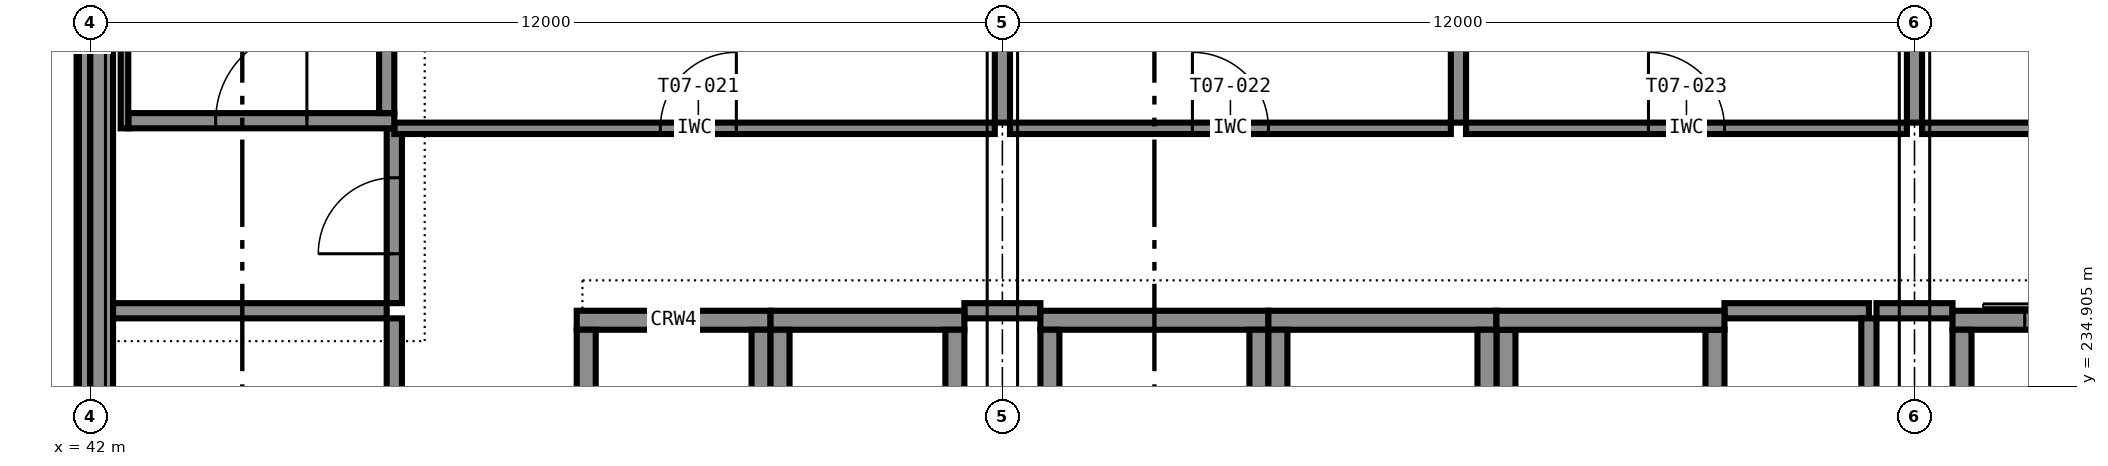
"""IFC4 building model, lengths in metres.
Left out: names, types, materials, properties, quantities, classifications, styles, units other than length and angle.
Written with IfcOpenShell. Run it as: python <this file> out.ifc"""

import sys

from ifc_helpers import new_model, si_unit, direction, frame, frame_2d, origin, place, context, subcontext, project, spatial, rectangle, extrude, element, fill, save


model = new_model("IFC4")
c1 = context("Model", 3, precision=1e-05, world=origin(), true_north=direction((0.0, 1.0)))
c2 = subcontext(c1, "Body", "Model", "MODEL_VIEW")
j1 = project(units=[si_unit("LENGTHUNIT", "METRE"), si_unit("PLANEANGLEUNIT", "RADIAN")], contexts=[c1])
p1 = place(None, origin())
s1 = spatial("IfcSite", under=j1, at=p1, CompositionType="ELEMENT")
p2 = place(p1, origin())
s2 = spatial("IfcBuilding", under=s1, at=p2, CompositionType="ELEMENT")
p3 = place(p2, frame((0.0, 0.0, 31.8)))
s3 = spatial("IfcBuildingStorey", under=s2, at=p3, CompositionType="ELEMENT", Elevation=31.8)
p4 = place(p3, frame((54.5, 235.775, 0.0), z_axis=(0.0, 0.0, 1.0), x_axis=(1.0, 0.0, 0.0)))
e1 = element("IfcWall", 1, at=p4, inside=s3, PredefinedType="SHEAR", context=c2, shape_type="SweptSolid", body=[
    extrude(rectangle(XDim=3.0, YDim=0.25, at=frame_2d((1.5, 0.0))), origin(), (0.0, 0.0, 1.0), 3.6),
])
for number, where, z_axis, x_axis in (
    (2, (54.625, 232.35, 0.0), (0.0, 0.0, 1.0), (0.0, 1.0, 0.0)),
    (3, (57.375, 232.35, 0.0), (0.0, 0.0, 1.0), (0.0, 1.0, 0.0)),
):
    element("IfcWall", number, at=place(p3, frame(where, z_axis=z_axis, x_axis=x_axis)), inside=s3, PredefinedType="SHEAR", context=c2, shape_type="SweptSolid", body=[
        extrude(rectangle(XDim=3.3, YDim=0.25, at=frame_2d((1.65, 0.0))), origin(), (0.0, 0.0, 1.0), 3.6),
    ])
p5 = place(p3, frame((57.5, 235.775, 0.0), z_axis=(0.0, 0.0, 1.0), x_axis=(1.0, 0.0, 0.0)))
e4 = element("IfcWall", 4, at=p5, inside=s3, PredefinedType="SHEAR", context=c2, shape_type="SweptSolid", body=[
    extrude(rectangle(XDim=3.0, YDim=0.25, at=frame_2d((1.5, 0.0))), origin(), (0.0, 0.0, 1.0), 3.6),
])
for number, where, z_axis, x_axis in (
    (5, (57.625, 232.35, 0.0), (0.0, 0.0, 1.0), (0.0, 1.0, 0.0)),
    (6, (60.375, 232.35, 0.0), (0.0, 0.0, 1.0), (0.0, 1.0, 0.0)),
):
    element("IfcWall", number, at=place(p3, frame(where, z_axis=z_axis, x_axis=x_axis)), inside=s3, PredefinedType="SHEAR", context=c2, shape_type="SweptSolid", body=[
        extrude(rectangle(XDim=3.3, YDim=0.25, at=frame_2d((1.65, 0.0))), origin(), (0.0, 0.0, 1.0), 3.6),
    ])
p6 = place(p3, frame((60.5, 235.775, 0.0), z_axis=(0.0, 0.0, 1.0), x_axis=(1.0, 0.0, 0.0)))
e7 = element("IfcWall", 7, at=p6, inside=s3, PredefinedType="SHEAR", context=c2, shape_type="SweptSolid", body=[
    extrude(rectangle(XDim=3.0, YDim=0.25, at=frame_2d((1.5, 0.0))), origin(), (0.0, 0.0, 1.0), 3.6),
])
for number, where, z_axis, x_axis in (
    (8, (60.625, 232.35, 0.0), (0.0, 0.0, 1.0), (0.0, 1.0, 0.0)),
    (9, (63.375, 232.35, 0.0), (0.0, 0.0, 1.0), (0.0, 1.0, 0.0)),
):
    element("IfcWall", number, at=place(p3, frame(where, z_axis=z_axis, x_axis=x_axis)), inside=s3, PredefinedType="SHEAR", context=c2, shape_type="SweptSolid", body=[
        extrude(rectangle(XDim=3.3, YDim=0.25, at=frame_2d((1.65, 0.0))), origin(), (0.0, 0.0, 1.0), 3.6),
    ])
p7 = place(p3, frame((66.5, 235.775, 0.0), z_axis=(0.0, 0.0, 1.0), x_axis=(1.0, 0.0, 0.0)))
e10 = element("IfcWall", 10, at=p7, inside=s3, PredefinedType="SHEAR", context=c2, shape_type="SweptSolid", body=[
    extrude(rectangle(XDim=3.0, YDim=0.25, at=frame_2d((1.5, 0.0))), origin(), (0.0, 0.0, 1.0), 3.6),
])
p8 = place(p7, frame((0.95, 0.0, 0.0)))
e11 = element("IfcOpeningElement", 11, at=p8, cuts=e10, PredefinedType="OPENING", context=c2, shape_type="SweptSolid", body=[
    extrude(rectangle(XDim=1.1, YDim=2.1, at=frame_2d((0.55, 1.05))), frame((0.0, 0.135, 0.0), z_axis=(0.0, -1.0, 0.0), x_axis=(1.0, 0.0, 0.0)), (0.0, 0.0, 1.0), 0.27),
])
p9 = place(p3, frame((66.625, 232.35, 0.0), z_axis=(0.0, 0.0, 1.0), x_axis=(0.0, 1.0, 0.0)))
e12 = element("IfcWall", 12, at=p9, inside=s3, PredefinedType="SHEAR", context=c2, shape_type="SweptSolid", body=[
    extrude(rectangle(XDim=3.3, YDim=0.25, at=frame_2d((1.65, 0.0))), origin(), (0.0, 0.0, 1.0), 3.6),
])
p10 = place(p3, frame((48.4, 235.775, 0.0), z_axis=(0.0, 0.0, 1.0), x_axis=(1.0, 0.0, 0.0)))
e13 = element("IfcWall", 13, at=p10, inside=s3, PredefinedType="SHEAR", context=c2, shape_type="SweptSolid", body=[
    extrude(rectangle(XDim=2.55, YDim=0.25, at=frame_2d((1.275, 0.0))), origin(), (0.0, 0.0, 1.0), 3.6),
])
for number, where, z_axis, x_axis in (
    (14, (48.525, 232.35, 0.0), (0.0, 0.0, 1.0), (0.0, 1.0, 0.0)),
    (15, (50.825, 232.35, 0.0), (0.0, 0.0, 1.0), (0.0, 1.0, 0.0)),
):
    element("IfcWall", number, at=place(p3, frame(where, z_axis=z_axis, x_axis=x_axis)), inside=s3, PredefinedType="SHEAR", context=c2, shape_type="SweptSolid", body=[
        extrude(rectangle(XDim=3.3, YDim=0.25, at=frame_2d((1.65, 0.0))), origin(), (0.0, 0.0, 1.0), 3.6),
    ])
p11 = place(p3, frame((50.95, 235.775, 0.0), z_axis=(0.0, 0.0, 1.0), x_axis=(1.0, 0.0, 0.0)))
e16 = element("IfcWall", 16, at=p11, inside=s3, PredefinedType="SHEAR", context=c2, shape_type="SweptSolid", body=[
    extrude(rectangle(XDim=2.55, YDim=0.25, at=frame_2d((1.275, 0.0))), origin(), (0.0, 0.0, 1.0), 3.6),
])
for number, where, z_axis, x_axis in (
    (17, (51.075, 232.35, 0.0), (0.0, 0.0, 1.0), (0.0, 1.0, 0.0)),
    (18, (53.375, 232.35, 0.0), (0.0, 0.0, 1.0), (0.0, 1.0, 0.0)),
):
    element("IfcWall", number, at=place(p3, frame(where, z_axis=z_axis, x_axis=x_axis)), inside=s3, PredefinedType="SHEAR", context=c2, shape_type="SweptSolid", body=[
        extrude(rectangle(XDim=3.3, YDim=0.25, at=frame_2d((1.65, 0.0))), origin(), (0.0, 0.0, 1.0), 3.6),
    ])
p12 = place(p3, frame((42.5, 238.4, 0.0), z_axis=(0.0, 0.0, 1.0), x_axis=(1.0, 0.0, 0.0)))
e19 = element("IfcWall", 19, at=p12, inside=s3, PredefinedType="SHEAR", context=c2, shape_type="SweptSolid", body=[
    extrude(rectangle(XDim=3.5, YDim=0.2, at=frame_2d((1.75, 0.0))), origin(), (0.0, 0.0, 1.0), 3.6),
])
p13 = place(p12, frame((1.15, 0.0, 0.0)))
e20 = element("IfcOpeningElement", 20, at=p13, cuts=e19, PredefinedType="OPENING", context=c2, shape_type="SweptSolid", body=[
    extrude(rectangle(XDim=1.2, YDim=2.1, at=frame_2d((0.6, 1.05))), frame((0.0, 0.11, 0.0), z_axis=(0.0, -1.0, 0.0), x_axis=(1.0, 0.0, 0.0)), (0.0, 0.0, 1.0), 0.22),
])
p14 = place(p3, frame((45.9, 238.5, 0.0), z_axis=(0.0, 0.0, 1.0), x_axis=(0.0, 1.0, 0.0)))
e21 = element("IfcWall", 21, at=p14, inside=s3, PredefinedType="SHEAR", context=c2, shape_type="SweptSolid", body=[
    extrude(rectangle(XDim=7.0, YDim=0.2, at=frame_2d((3.5, 0.0))), origin(), (0.0, 0.0, 1.0), 3.6),
])
p15 = place(p3, frame((42.45, 238.3, 0.0), z_axis=(0.0, 0.0, 1.0), x_axis=(0.0, 1.0, 0.0)))
e22 = element("IfcWall", 22, at=p15, inside=s3, PredefinedType="SHEAR", context=c2, shape_type="SweptSolid", body=[
    extrude(rectangle(XDim=7.3, YDim=0.1, at=frame_2d((3.65, 0.0))), origin(), (0.0, 0.0, 1.0), 3.4),
])
p16 = place(p3, frame((42.15, 245.55, 0.0), z_axis=(0.0, 0.0, 1.0), x_axis=(0.0, -1.0, 0.0)))
e23 = element("IfcWall", 23, at=p16, inside=s3, PredefinedType="STANDARD", context=c2, shape_type="SweptSolid", body=[
    extrude(rectangle(XDim=11.1, YDim=0.3, at=frame_2d((5.55, 0.0))), origin(), (0.0, 0.0, 1.0), 2.6),
])
p17 = place(p3, frame((41.925, 245.55, 3.4), z_axis=(0.0, 0.0, 1.0), x_axis=(0.0, -1.0, 0.0)))
e24 = element("IfcWall", 24, at=p17, inside=s3, PredefinedType="STANDARD", context=c2, shape_type="SweptSolid", body=[
    extrude(rectangle(XDim=11.1, YDim=0.15, at=frame_2d((5.55, 0.0))), origin(), (0.0, 0.0, 1.0), 0.2),
])
p18 = place(p3, frame((42.3, 235.9, 0.0), z_axis=(0.0, 0.0, 1.0), x_axis=(1.0, 0.0, 0.0)))
e25 = element("IfcWall", 25, at=p18, inside=s3, PredefinedType="PARTITIONING", context=c2, shape_type="SweptSolid", body=[
    extrude(rectangle(XDim=3.6, YDim=0.2, at=frame_2d((1.8, 0.0))), origin(), (0.0, 0.0, 1.0), 3.4),
])
p19 = place(p3, frame((53.5, 235.9, 0.0), z_axis=(0.0, 0.0, 1.0), x_axis=(1.0, 0.0, 0.0)))
e26 = element("IfcWall", 26, at=p19, inside=s3, PredefinedType="PARTITIONING", context=c2, shape_type="SweptSolid", body=[
    extrude(rectangle(XDim=1.0, YDim=0.2, at=frame_2d((0.5, 0.0))), origin(), (0.0, 0.0, 1.0), 3.4),
])
p20 = place(p3, frame((63.5, 235.9, 0.0), z_axis=(0.0, 0.0, 1.0), x_axis=(1.0, 0.0, 0.0)))
e27 = element("IfcWall", 27, at=p20, inside=s3, PredefinedType="PARTITIONING", context=c2, shape_type="SweptSolid", body=[
    extrude(rectangle(XDim=1.9, YDim=0.2, at=frame_2d((0.95, 0.0))), origin(), (0.0, 0.0, 1.0), 3.4),
])
p21 = place(p3, frame((65.5, 235.9, 0.0), z_axis=(0.0, 0.0, 1.0), x_axis=(1.0, 0.0, 0.0)))
e28 = element("IfcWall", 28, at=p21, inside=s3, PredefinedType="PARTITIONING", context=c2, shape_type="SweptSolid", body=[
    extrude(rectangle(XDim=1.0, YDim=0.2, at=frame_2d((0.5, 0.0))), origin(), (0.0, 0.0, 1.0), 3.4),
])
p22 = place(p3, frame((46.0, 232.2, 0.0), z_axis=(0.0, 0.0, 1.0), x_axis=(0.0, 1.0, 0.0)))
e29 = element("IfcWall", 29, at=p22, inside=s3, PredefinedType="PARTITIONING", context=c2, shape_type="SweptSolid", body=[
    extrude(rectangle(XDim=3.6, YDim=0.2, at=frame_2d((1.8, 0.0))), origin(), (0.0, 0.0, 1.0), 3.4),
])
p23 = place(p22, frame((1.35, 0.0, 0.0)))
e30 = element("IfcOpeningElement", 30, at=p23, cuts=e29, PredefinedType="OPENING", context=c2, shape_type="SweptSolid", body=[
    extrude(rectangle(XDim=0.9, YDim=2.1, at=frame_2d((0.45, 1.05))), frame((0.0, 0.11, 0.0), z_axis=(0.0, -1.0, 0.0), x_axis=(1.0, 0.0, 0.0)), (0.0, 0.0, 1.0), 0.22),
])
p24 = place(p3, frame((46.0, 236.0, 0.0), z_axis=(0.0, 0.0, 1.0), x_axis=(0.0, 1.0, 0.0)))
e31 = element("IfcWall", 31, at=p24, inside=s3, PredefinedType="PARTITIONING", context=c2, shape_type="SweptSolid", body=[
    extrude(rectangle(XDim=2.3, YDim=0.2, at=frame_2d((1.15, 0.0))), origin(), (0.0, 0.0, 1.0), 3.4),
])
p25 = place(p24, frame((0.65, 0.0, 0.0)))
e32 = element("IfcOpeningElement", 32, at=p25, cuts=e31, PredefinedType="OPENING", context=c2, shape_type="SweptSolid", body=[
    extrude(rectangle(XDim=1.0, YDim=2.1, at=frame_2d((0.5, 1.05))), frame((0.0, 0.11, 0.0), z_axis=(0.0, -1.0, 0.0), x_axis=(1.0, 0.0, 0.0)), (0.0, 0.0, 1.0), 0.22),
])
p26 = place(p3, frame((65.4, 232.2, 0.0), z_axis=(0.0, 0.0, 1.0), x_axis=(0.0, 1.0, 0.0)))
e33 = element("IfcWall", 33, at=p26, inside=s3, PredefinedType="PARTITIONING", context=c2, shape_type="SweptSolid", body=[
    extrude(rectangle(XDim=3.6, YDim=0.2, at=frame_2d((1.8, 0.0))), origin(), (0.0, 0.0, 1.0), 3.4),
])
p27 = place(p3, frame((46.0, 238.3, 0.0), z_axis=(0.0, 0.0, 1.0), x_axis=(1.0, 0.0, 0.0)))
e34 = element("IfcWall", 34, at=p27, inside=s3, PredefinedType="PARTITIONING", context=c2, shape_type="SweptSolid", body=[
    extrude(rectangle(XDim=7.9, YDim=0.15, at=frame_2d((3.95, 0.0))), origin(), (0.0, 0.0, 1.0), 3.4),
])
p28 = place(p27, frame((3.5, 0.0, 0.0)))
e35 = element("IfcOpeningElement", 35, at=p28, cuts=e34, PredefinedType="OPENING", context=c2, shape_type="SweptSolid", body=[
    extrude(rectangle(XDim=1.0, YDim=2.1, at=frame_2d((0.5, 1.05))), frame((0.0, 0.085, 0.0), z_axis=(0.0, -1.0, 0.0), x_axis=(1.0, 0.0, 0.0)), (0.0, 0.0, 1.0), 0.17),
])
p29 = place(p3, frame((54.1, 238.3, 0.0), z_axis=(0.0, 0.0, 1.0), x_axis=(1.0, 0.0, 0.0)))
e36 = element("IfcWall", 36, at=p29, inside=s3, PredefinedType="PARTITIONING", context=c2, shape_type="SweptSolid", body=[
    extrude(rectangle(XDim=5.8, YDim=0.15, at=frame_2d((2.9, 0.0))), origin(), (0.0, 0.0, 1.0), 3.4),
])
p30 = place(p29, frame((2.4, 0.0, 0.0)))
e37 = element("IfcOpeningElement", 37, at=p30, cuts=e36, PredefinedType="OPENING", context=c2, shape_type="SweptSolid", body=[
    extrude(rectangle(XDim=1.0, YDim=2.1, at=frame_2d((0.5, 1.05))), frame((0.0, 0.085, 0.0), z_axis=(0.0, -1.0, 0.0), x_axis=(1.0, 0.0, 0.0)), (0.0, 0.0, 1.0), 0.17),
])
p31 = place(p3, frame((60.1, 238.3, 0.0), z_axis=(0.0, 0.0, 1.0), x_axis=(1.0, 0.0, 0.0)))
e38 = element("IfcWall", 38, at=p31, inside=s3, PredefinedType="PARTITIONING", context=c2, shape_type="SweptSolid", body=[
    extrude(rectangle(XDim=5.8, YDim=0.15, at=frame_2d((2.9, 0.0))), origin(), (0.0, 0.0, 1.0), 3.4),
])
p32 = place(p31, frame((2.4, 0.0, 0.0)))
e39 = element("IfcOpeningElement", 39, at=p32, cuts=e38, PredefinedType="OPENING", context=c2, shape_type="SweptSolid", body=[
    extrude(rectangle(XDim=1.0, YDim=2.1, at=frame_2d((0.5, 1.05))), frame((0.0, 0.085, 0.0), z_axis=(0.0, -1.0, 0.0), x_axis=(1.0, 0.0, 0.0)), (0.0, 0.0, 1.0), 0.17),
])
p33 = place(p3, frame((66.1, 238.3, 0.0), z_axis=(0.0, 0.0, 1.0), x_axis=(1.0, 0.0, 0.0)))
e40 = element("IfcWall", 40, at=p33, inside=s3, PredefinedType="PARTITIONING", context=c2, shape_type="SweptSolid", body=[
    extrude(rectangle(XDim=3.8, YDim=0.15, at=frame_2d((1.9, 0.0))), origin(), (0.0, 0.0, 1.0), 3.4),
])
p34 = place(p33, frame((2.25, 0.0, 0.0)))
e41 = element("IfcOpeningElement", 41, at=p34, cuts=e40, PredefinedType="OPENING", context=c2, shape_type="SweptSolid", body=[
    extrude(rectangle(XDim=1.0, YDim=2.1, at=frame_2d((0.5, 1.05))), frame((0.0, 0.085, 0.0), z_axis=(0.0, -1.0, 0.0), x_axis=(1.0, 0.0, 0.0)), (0.0, 0.0, 1.0), 0.17),
])
p35 = place(p3, frame((54.0, 245.55, 0.0), z_axis=(0.0, 0.0, 1.0), x_axis=(0.0, -1.0, 0.0)))
e42 = element("IfcWall", 42, at=p35, inside=s3, PredefinedType="PARTITIONING", context=c2, shape_type="SweptSolid", body=[
    extrude(rectangle(XDim=7.175, YDim=0.2, at=frame_2d((3.587, 0.0))), origin(), (0.0, 0.0, 1.0), 2.6),
])
p36 = place(p3, frame((60.0, 245.7, 0.0), z_axis=(0.0, 0.0, 1.0), x_axis=(0.0, -1.0, 0.0)))
e43 = element("IfcWall", 43, at=p36, inside=s3, PredefinedType="PARTITIONING", context=c2, shape_type="SweptSolid", body=[
    extrude(rectangle(XDim=7.325, YDim=0.2, at=frame_2d((3.663, 0.0))), origin(), (0.0, 0.0, 1.0), 3.4),
])
p37 = place(p3, frame((66.0, 245.55, 0.0), z_axis=(0.0, 0.0, 1.0), x_axis=(0.0, -1.0, 0.0)))
e44 = element("IfcWall", 44, at=p37, inside=s3, PredefinedType="PARTITIONING", context=c2, shape_type="SweptSolid", body=[
    extrude(rectangle(XDim=7.175, YDim=0.2, at=frame_2d((3.587, 0.0))), origin(), (0.0, 0.0, 1.0), 2.6),
])
p38 = place(p25, origin())
e45 = element("IfcDoor", 45, at=p38, inside=s3, OperationType="SINGLE_SWING_LEFT", PredefinedType="DOOR", context=c2, shape_type="SweptSolid", body=[
    extrude(rectangle(XDim=1.0, YDim=2.1, at=frame_2d((0.5, 1.05))), frame((0.0, 0.025, 0.0), z_axis=(0.0, -1.0, 0.0), x_axis=(1.0, 0.0, 0.0)), (0.0, 0.0, 1.0), 0.05),
])
fill(e32, e45)
p39 = place(p28, origin())
e46 = element("IfcDoor", 46, at=p39, inside=s3, OperationType="SINGLE_SWING_RIGHT", PredefinedType="DOOR", context=c2, shape_type="SweptSolid", body=[
    extrude(rectangle(XDim=1.0, YDim=2.1, at=frame_2d((0.5, 1.05))), frame((0.0, 0.025, 0.0), z_axis=(0.0, -1.0, 0.0), x_axis=(1.0, 0.0, 0.0)), (0.0, 0.0, 1.0), 0.05),
])
fill(e35, e46)
p40 = place(p30, origin())
e47 = element("IfcDoor", 47, at=p40, inside=s3, OperationType="SINGLE_SWING_LEFT", PredefinedType="DOOR", context=c2, shape_type="SweptSolid", body=[
    extrude(rectangle(XDim=1.0, YDim=2.1, at=frame_2d((0.5, 1.05))), frame((0.0, 0.025, 0.0), z_axis=(0.0, -1.0, 0.0), x_axis=(1.0, 0.0, 0.0)), (0.0, 0.0, 1.0), 0.05),
])
fill(e37, e47)
p41 = place(p32, origin())
e48 = element("IfcDoor", 48, at=p41, inside=s3, OperationType="SINGLE_SWING_LEFT", PredefinedType="DOOR", context=c2, shape_type="SweptSolid", body=[
    extrude(rectangle(XDim=1.0, YDim=2.1, at=frame_2d((0.5, 1.05))), frame((0.0, 0.025, 0.0), z_axis=(0.0, -1.0, 0.0), x_axis=(1.0, 0.0, 0.0)), (0.0, 0.0, 1.0), 0.05),
])
fill(e39, e48)
p42 = place(p8, origin())
e49 = element("IfcDoor", 49, at=p42, inside=s3, OperationType="SLIDING_TO_LEFT", PredefinedType="DOOR", context=c2, shape_type="SweptSolid", body=[
    extrude(rectangle(XDim=1.1, YDim=2.1, at=frame_2d((0.55, 1.05))), frame((0.0, 0.025, 0.0), z_axis=(0.0, -1.0, 0.0), x_axis=(1.0, 0.0, 0.0)), (0.0, 0.0, 1.0), 0.05),
])
fill(e11, e49)
p43 = place(p13, origin())
e50 = element("IfcDoor", 50, at=p43, inside=s3, OperationType="SINGLE_SWING_RIGHT", PredefinedType="DOOR", context=c2, shape_type="SweptSolid", body=[
    extrude(rectangle(XDim=1.2, YDim=2.1, at=frame_2d((0.6, 1.05))), frame((0.0, 0.025, 0.0), z_axis=(0.0, -1.0, 0.0), x_axis=(1.0, 0.0, 0.0)), (0.0, 0.0, 1.0), 0.05),
])
fill(e20, e50)
save(model, sys.argv[1])
